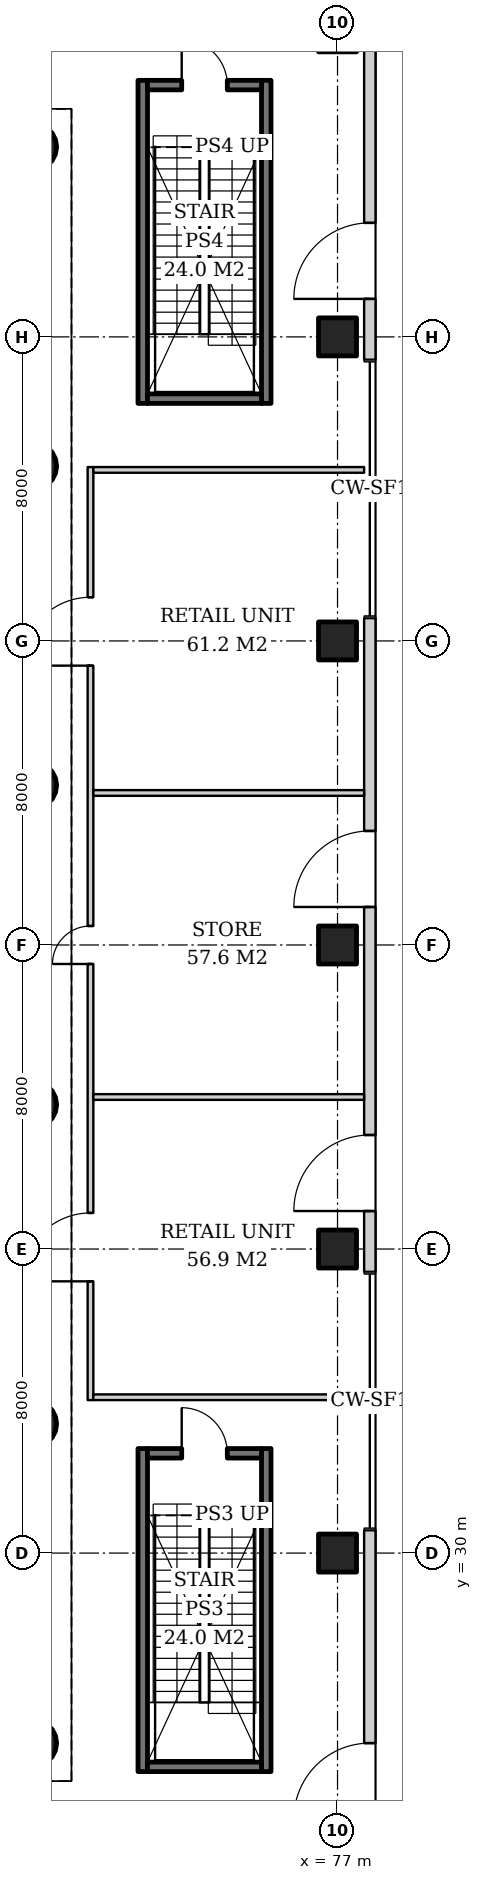
"""IFC4 building model, lengths in metres.
Left out: names, types, materials, properties, quantities, classifications, styles, units other than length and angle.
Written with IfcOpenShell. Run it as: python <this file> out.ifc"""

import sys

from ifc_helpers import new_model, si_unit, direction, frame, frame_2d, origin, origin_2d, place, context, subcontext, project, spatial, rectangle, hollow_circle, extrude, element, fill, save


model = new_model("IFC4")
c1 = context("Model", 3, precision=1e-05, world=origin(), true_north=direction((0.0, 1.0)))
c2 = subcontext(c1, "Body", "Model", "MODEL_VIEW")
j1 = project(units=[si_unit("LENGTHUNIT", "METRE"), si_unit("PLANEANGLEUNIT", "RADIAN")], contexts=[c1])
p1 = place(None, origin())
s1 = spatial("IfcSite", under=j1, at=p1, CompositionType="ELEMENT")
p2 = place(p1, origin())
s2 = spatial("IfcBuilding", under=s1, at=p2, CompositionType="ELEMENT")
p3 = place(p2, origin())
s3 = spatial("IfcBuildingStorey", under=s2, at=p3, CompositionType="ELEMENT", Elevation=0.0)
for number, where, z_axis, x_axis in (
    (1, (77.0, 30.0, 0.0), (0.0, 0.0, 1.0), (1.0, 0.0, 0.0)),
    (2, (77.0, 38.0, 0.0), (0.0, 0.0, 1.0), (1.0, 0.0, 0.0)),
    (3, (77.0, 46.0, 0.0), (0.0, 0.0, 1.0), (1.0, 0.0, 0.0)),
    (4, (77.0, 54.0, 0.0), (0.0, 0.0, 1.0), (1.0, 0.0, 0.0)),
    (5, (77.0, 62.0, 0.0), (0.0, 0.0, 1.0), (1.0, 0.0, 0.0)),
):
    element("IfcColumn", number, at=place(p3, frame(where, z_axis=z_axis, x_axis=x_axis)), inside=s3, PredefinedType="COLUMN", context=c2, shape_type="SweptSolid", body=[
        extrude(rectangle(XDim=1.0, YDim=1.0, at=origin_2d()), origin(), (0.0, 0.0, 1.0), 6.0),
    ])
for number, where, z_axis, x_axis in (
    (6, (69.0, 25.0, 0.0), (0.0, 0.0, 1.0), (1.0, 0.0, 0.0)),
    (7, (69.0, 67.0, 0.0), (0.0, 0.0, 1.0), (1.0, 0.0, 0.0)),
    (8, (69.0, 33.4, 0.0), (0.0, 0.0, 1.0), (1.0, 0.0, 0.0)),
    (9, (69.0, 41.8, 0.0), (0.0, 0.0, 1.0), (1.0, 0.0, 0.0)),
    (10, (69.0, 50.2, 0.0), (0.0, 0.0, 1.0), (1.0, 0.0, 0.0)),
    (11, (69.0, 58.6, 0.0), (0.0, 0.0, 1.0), (1.0, 0.0, 0.0)),
):
    element("IfcColumn", number, at=place(p3, frame(where, z_axis=z_axis, x_axis=x_axis)), inside=s3, PredefinedType="COLUMN", context=c2, shape_type="SweptSolid", body=[
        extrude(hollow_circle(Radius=0.61, WallThickness=0.04, at=origin_2d()), origin(), (0.0, 0.0, 1.0), 6.0),
    ])
p4 = place(p3, frame((77.85, 13.4, 0.0), z_axis=(0.0, 0.0, 1.0), x_axis=(0.0, 1.0, 0.0)))
e12 = element("IfcWall", 12, at=p4, inside=s3, PredefinedType="SOLIDWALL", context=c2, shape_type="SweptSolid", body=[
    extrude(rectangle(XDim=17.2, YDim=0.3, at=frame_2d((8.6, 0.0))), origin(), (0.0, 0.0, 1.0), 5.7),
])
p5 = place(p4, frame((1.6, 0.0, 0.0)))
e13 = element("IfcOpeningElement", 13, at=p5, cuts=e12, PredefinedType="OPENING", context=c2, shape_type="SweptSolid", body=[
    extrude(rectangle(XDim=2.0, YDim=2.7, at=frame_2d((1.0, 1.35))), frame((0.0, 0.16, 0.0), z_axis=(0.0, -1.0, 0.0), x_axis=(1.0, 0.0, 0.0)), (0.0, 0.0, 1.0), 0.32),
])
p6 = place(p4, frame((9.6, 0.0, 0.0)))
e14 = element("IfcOpeningElement", 14, at=p6, cuts=e12, PredefinedType="OPENING", context=c2, shape_type="SweptSolid", body=[
    extrude(rectangle(XDim=2.0, YDim=2.7, at=frame_2d((1.0, 1.35))), frame((0.0, 0.16, 0.0), z_axis=(0.0, -1.0, 0.0), x_axis=(1.0, 0.0, 0.0)), (0.0, 0.0, 1.0), 0.32),
])
p7 = place(p3, frame((77.85, 37.4, 0.0), z_axis=(0.0, 0.0, 1.0), x_axis=(0.0, 1.0, 0.0)))
e15 = element("IfcWall", 15, at=p7, inside=s3, PredefinedType="SOLIDWALL", context=c2, shape_type="SweptSolid", body=[
    extrude(rectangle(XDim=17.2, YDim=0.3, at=frame_2d((8.6, 0.0))), origin(), (0.0, 0.0, 1.0), 5.7),
])
p8 = place(p7, frame((1.6, 0.0, 0.0)))
e16 = element("IfcOpeningElement", 16, at=p8, cuts=e15, PredefinedType="OPENING", context=c2, shape_type="SweptSolid", body=[
    extrude(rectangle(XDim=2.0, YDim=2.7, at=frame_2d((1.0, 1.35))), frame((0.0, 0.16, 0.0), z_axis=(0.0, -1.0, 0.0), x_axis=(1.0, 0.0, 0.0)), (0.0, 0.0, 1.0), 0.32),
])
p9 = place(p7, frame((9.6, 0.0, 0.0)))
e17 = element("IfcOpeningElement", 17, at=p9, cuts=e15, PredefinedType="OPENING", context=c2, shape_type="SweptSolid", body=[
    extrude(rectangle(XDim=2.0, YDim=2.7, at=frame_2d((1.0, 1.35))), frame((0.0, 0.16, 0.0), z_axis=(0.0, -1.0, 0.0), x_axis=(1.0, 0.0, 0.0)), (0.0, 0.0, 1.0), 0.32),
])
p10 = place(p3, frame((77.85, 61.4, 0.0), z_axis=(0.0, 0.0, 1.0), x_axis=(0.0, 1.0, 0.0)))
e18 = element("IfcWall", 18, at=p10, inside=s3, PredefinedType="SOLIDWALL", context=c2, shape_type="SweptSolid", body=[
    extrude(rectangle(XDim=17.2, YDim=0.3, at=frame_2d((8.6, 0.0))), origin(), (0.0, 0.0, 1.0), 5.7),
])
p11 = place(p10, frame((1.6, 0.0, 0.0)))
e19 = element("IfcOpeningElement", 19, at=p11, cuts=e18, PredefinedType="OPENING", context=c2, shape_type="SweptSolid", body=[
    extrude(rectangle(XDim=2.0, YDim=2.7, at=frame_2d((1.0, 1.35))), frame((0.0, 0.16, 0.0), z_axis=(0.0, -1.0, 0.0), x_axis=(1.0, 0.0, 0.0)), (0.0, 0.0, 1.0), 0.32),
])
p12 = place(p10, frame((9.6, 0.0, 0.0)))
e20 = element("IfcOpeningElement", 20, at=p12, cuts=e18, PredefinedType="OPENING", context=c2, shape_type="SweptSolid", body=[
    extrude(rectangle(XDim=2.0, YDim=2.7, at=frame_2d((1.0, 1.35))), frame((0.0, 0.16, 0.0), z_axis=(0.0, -1.0, 0.0), x_axis=(1.0, 0.0, 0.0)), (0.0, 0.0, 1.0), 0.32),
])
for number, where, z_axis, x_axis in (
    (21, (71.875, 24.25, 0.0), (0.0, 0.0, 1.0), (0.0, 1.0, 0.0)),
    (22, (75.125, 24.25, 0.0), (0.0, 0.0, 1.0), (0.0, 1.0, 0.0)),
):
    element("IfcWall", number, at=place(p3, frame(where, z_axis=z_axis, x_axis=x_axis)), inside=s3, PredefinedType="SOLIDWALL", context=c2, shape_type="SweptSolid", body=[
        extrude(rectangle(XDim=8.5, YDim=0.25, at=frame_2d((4.25, 0.0))), origin(), (0.0, 0.0, 1.0), 5.7),
    ])
p13 = place(p3, frame((72.0, 24.375, 0.0), z_axis=(0.0, 0.0, 1.0), x_axis=(1.0, 0.0, 0.0)))
e23 = element("IfcWall", 23, at=p13, inside=s3, PredefinedType="SOLIDWALL", context=c2, shape_type="SweptSolid", body=[
    extrude(rectangle(XDim=3.0, YDim=0.25, at=frame_2d((1.5, 0.0))), origin(), (0.0, 0.0, 1.0), 5.7),
])
p14 = place(p3, frame((72.0, 32.625, 0.0), z_axis=(0.0, 0.0, 1.0), x_axis=(1.0, 0.0, 0.0)))
e24 = element("IfcWall", 24, at=p14, inside=s3, PredefinedType="SOLIDWALL", context=c2, shape_type="SweptSolid", body=[
    extrude(rectangle(XDim=3.0, YDim=0.25, at=frame_2d((1.5, 0.0))), origin(), (0.0, 0.0, 1.0), 5.7),
])
p15 = place(p14, frame((0.9, 0.0, 0.0)))
e25 = element("IfcOpeningElement", 25, at=p15, cuts=e24, PredefinedType="OPENING", context=c2, shape_type="SweptSolid", body=[
    extrude(rectangle(XDim=1.2, YDim=2.1, at=frame_2d((0.6, 1.05))), frame((0.0, 0.135, 0.0), z_axis=(0.0, -1.0, 0.0), x_axis=(1.0, 0.0, 0.0)), (0.0, 0.0, 1.0), 0.27),
])
for number, where, z_axis, x_axis in (
    (26, (71.875, 60.25, 0.0), (0.0, 0.0, 1.0), (0.0, 1.0, 0.0)),
    (27, (75.125, 60.25, 0.0), (0.0, 0.0, 1.0), (0.0, 1.0, 0.0)),
):
    element("IfcWall", number, at=place(p3, frame(where, z_axis=z_axis, x_axis=x_axis)), inside=s3, PredefinedType="SOLIDWALL", context=c2, shape_type="SweptSolid", body=[
        extrude(rectangle(XDim=8.5, YDim=0.25, at=frame_2d((4.25, 0.0))), origin(), (0.0, 0.0, 1.0), 5.7),
    ])
p16 = place(p3, frame((72.0, 60.375, 0.0), z_axis=(0.0, 0.0, 1.0), x_axis=(1.0, 0.0, 0.0)))
e28 = element("IfcWall", 28, at=p16, inside=s3, PredefinedType="SOLIDWALL", context=c2, shape_type="SweptSolid", body=[
    extrude(rectangle(XDim=3.0, YDim=0.25, at=frame_2d((1.5, 0.0))), origin(), (0.0, 0.0, 1.0), 5.7),
])
p17 = place(p3, frame((72.0, 68.625, 0.0), z_axis=(0.0, 0.0, 1.0), x_axis=(1.0, 0.0, 0.0)))
e29 = element("IfcWall", 29, at=p17, inside=s3, PredefinedType="SOLIDWALL", context=c2, shape_type="SweptSolid", body=[
    extrude(rectangle(XDim=3.0, YDim=0.25, at=frame_2d((1.5, 0.0))), origin(), (0.0, 0.0, 1.0), 5.7),
])
p18 = place(p17, frame((0.9, 0.0, 0.0)))
e30 = element("IfcOpeningElement", 30, at=p18, cuts=e29, PredefinedType="OPENING", context=c2, shape_type="SweptSolid", body=[
    extrude(rectangle(XDim=1.2, YDim=2.1, at=frame_2d((0.6, 1.05))), frame((0.0, 0.135, 0.0), z_axis=(0.0, -1.0, 0.0), x_axis=(1.0, 0.0, 0.0)), (0.0, 0.0, 1.0), 0.27),
])
p19 = place(p3, frame((70.5, 34.025, 0.0), z_axis=(0.0, 0.0, 1.0), x_axis=(0.0, 1.0, 0.0)))
e31 = element("IfcWall", 31, at=p19, inside=s3, PredefinedType="PARTITIONING", context=c2, shape_type="SweptSolid", body=[
    extrude(rectangle(XDim=24.55, YDim=0.15, at=frame_2d((12.275, 0.0))), origin(), (0.0, 0.0, 1.0), 5.7),
])
p20 = place(p19, frame((3.125, 0.0, 0.0)))
e32 = element("IfcOpeningElement", 32, at=p20, cuts=e31, PredefinedType="OPENING", context=c2, shape_type="SweptSolid", body=[
    extrude(rectangle(XDim=1.8, YDim=2.4, at=frame_2d((0.9, 1.2))), frame((0.0, 0.085, 0.0), z_axis=(0.0, -1.0, 0.0), x_axis=(1.0, 0.0, 0.0)), (0.0, 0.0, 1.0), 0.17),
])
p21 = place(p19, frame((11.475, 0.0, 0.0)))
e33 = element("IfcOpeningElement", 33, at=p21, cuts=e31, PredefinedType="OPENING", context=c2, shape_type="SweptSolid", body=[
    extrude(rectangle(XDim=1.0, YDim=2.1, at=frame_2d((0.5, 1.05))), frame((0.0, 0.085, 0.0), z_axis=(0.0, -1.0, 0.0), x_axis=(1.0, 0.0, 0.0)), (0.0, 0.0, 1.0), 0.17),
])
p22 = place(p19, frame((19.325, 0.0, 0.0)))
e34 = element("IfcOpeningElement", 34, at=p22, cuts=e31, PredefinedType="OPENING", context=c2, shape_type="SweptSolid", body=[
    extrude(rectangle(XDim=1.8, YDim=2.4, at=frame_2d((0.9, 1.2))), frame((0.0, 0.085, 0.0), z_axis=(0.0, -1.0, 0.0), x_axis=(1.0, 0.0, 0.0)), (0.0, 0.0, 1.0), 0.17),
])
for number, where, z_axis, x_axis in (
    (35, (70.575, 34.1, 0.0), (0.0, 0.0, 1.0), (1.0, 0.0, 0.0)),
    (36, (70.575, 58.5, 0.0), (0.0, 0.0, 1.0), (1.0, 0.0, 0.0)),
    (37, (70.575, 42.0, 0.0), (0.0, 0.0, 1.0), (1.0, 0.0, 0.0)),
    (38, (70.575, 50.0, 0.0), (0.0, 0.0, 1.0), (1.0, 0.0, 0.0)),
):
    element("IfcWall", number, at=place(p3, frame(where, z_axis=z_axis, x_axis=x_axis)), inside=s3, PredefinedType="PARTITIONING", context=c2, shape_type="SweptSolid", body=[
        extrude(rectangle(XDim=7.125, YDim=0.15, at=frame_2d((3.562, 0.0))), origin(), (0.0, 0.0, 1.0), 5.7),
    ])
p23 = place(p6, origin())
e39 = element("IfcDoor", 39, at=p23, inside=s3, OperationType="DOUBLE_DOOR_SINGLE_SWING", PredefinedType="DOOR", context=c2, shape_type="SweptSolid", body=[
    extrude(rectangle(XDim=2.0, YDim=2.7, at=frame_2d((1.0, 1.35))), frame((0.0, 0.025, 0.0), z_axis=(0.0, -1.0, 0.0), x_axis=(1.0, 0.0, 0.0)), (0.0, 0.0, 1.0), 0.05),
])
fill(e14, e39)
p24 = place(p8, origin())
e40 = element("IfcDoor", 40, at=p24, inside=s3, OperationType="DOUBLE_DOOR_SINGLE_SWING", PredefinedType="DOOR", context=c2, shape_type="SweptSolid", body=[
    extrude(rectangle(XDim=2.0, YDim=2.7, at=frame_2d((1.0, 1.35))), frame((0.0, 0.025, 0.0), z_axis=(0.0, -1.0, 0.0), x_axis=(1.0, 0.0, 0.0)), (0.0, 0.0, 1.0), 0.05),
])
fill(e16, e40)
p25 = place(p9, origin())
e41 = element("IfcDoor", 41, at=p25, inside=s3, OperationType="DOUBLE_DOOR_SINGLE_SWING", PredefinedType="DOOR", context=c2, shape_type="SweptSolid", body=[
    extrude(rectangle(XDim=2.0, YDim=2.7, at=frame_2d((1.0, 1.35))), frame((0.0, 0.025, 0.0), z_axis=(0.0, -1.0, 0.0), x_axis=(1.0, 0.0, 0.0)), (0.0, 0.0, 1.0), 0.05),
])
fill(e17, e41)
p26 = place(p11, origin())
e42 = element("IfcDoor", 42, at=p26, inside=s3, OperationType="DOUBLE_DOOR_SINGLE_SWING", PredefinedType="DOOR", context=c2, shape_type="SweptSolid", body=[
    extrude(rectangle(XDim=2.0, YDim=2.7, at=frame_2d((1.0, 1.35))), frame((0.0, 0.025, 0.0), z_axis=(0.0, -1.0, 0.0), x_axis=(1.0, 0.0, 0.0)), (0.0, 0.0, 1.0), 0.05),
])
fill(e19, e42)
p27 = place(p15, origin())
e43 = element("IfcDoor", 43, at=p27, inside=s3, OperationType="SINGLE_SWING_LEFT", PredefinedType="DOOR", context=c2, shape_type="SweptSolid", body=[
    extrude(rectangle(XDim=1.2, YDim=2.1, at=frame_2d((0.6, 1.05))), frame((0.0, 0.025, 0.0), z_axis=(0.0, -1.0, 0.0), x_axis=(1.0, 0.0, 0.0)), (0.0, 0.0, 1.0), 0.05),
])
fill(e25, e43)
p28 = place(p18, origin())
e44 = element("IfcDoor", 44, at=p28, inside=s3, OperationType="SINGLE_SWING_LEFT", PredefinedType="DOOR", context=c2, shape_type="SweptSolid", body=[
    extrude(rectangle(XDim=1.2, YDim=2.1, at=frame_2d((0.6, 1.05))), frame((0.0, 0.025, 0.0), z_axis=(0.0, -1.0, 0.0), x_axis=(1.0, 0.0, 0.0)), (0.0, 0.0, 1.0), 0.05),
])
fill(e30, e44)
p29 = place(p20, origin())
e45 = element("IfcDoor", 45, at=p29, inside=s3, OperationType="DOUBLE_DOOR_SINGLE_SWING", PredefinedType="DOOR", context=c2, shape_type="SweptSolid", body=[
    extrude(rectangle(XDim=1.8, YDim=2.4, at=frame_2d((0.9, 1.2))), frame((0.0, 0.025, 0.0), z_axis=(0.0, -1.0, 0.0), x_axis=(1.0, 0.0, 0.0)), (0.0, 0.0, 1.0), 0.05),
])
fill(e32, e45)
p30 = place(p21, origin())
e46 = element("IfcDoor", 46, at=p30, inside=s3, OperationType="SINGLE_SWING_LEFT", PredefinedType="DOOR", context=c2, shape_type="SweptSolid", body=[
    extrude(rectangle(XDim=1.0, YDim=2.1, at=frame_2d((0.5, 1.05))), frame((0.0, 0.025, 0.0), z_axis=(0.0, -1.0, 0.0), x_axis=(1.0, 0.0, 0.0)), (0.0, 0.0, 1.0), 0.05),
])
fill(e33, e46)
p31 = place(p22, origin())
e47 = element("IfcDoor", 47, at=p31, inside=s3, OperationType="DOUBLE_DOOR_SINGLE_SWING", PredefinedType="DOOR", context=c2, shape_type="SweptSolid", body=[
    extrude(rectangle(XDim=1.8, YDim=2.4, at=frame_2d((0.9, 1.2))), frame((0.0, 0.025, 0.0), z_axis=(0.0, -1.0, 0.0), x_axis=(1.0, 0.0, 0.0)), (0.0, 0.0, 1.0), 0.05),
])
fill(e34, e47)
save(model, sys.argv[1])
